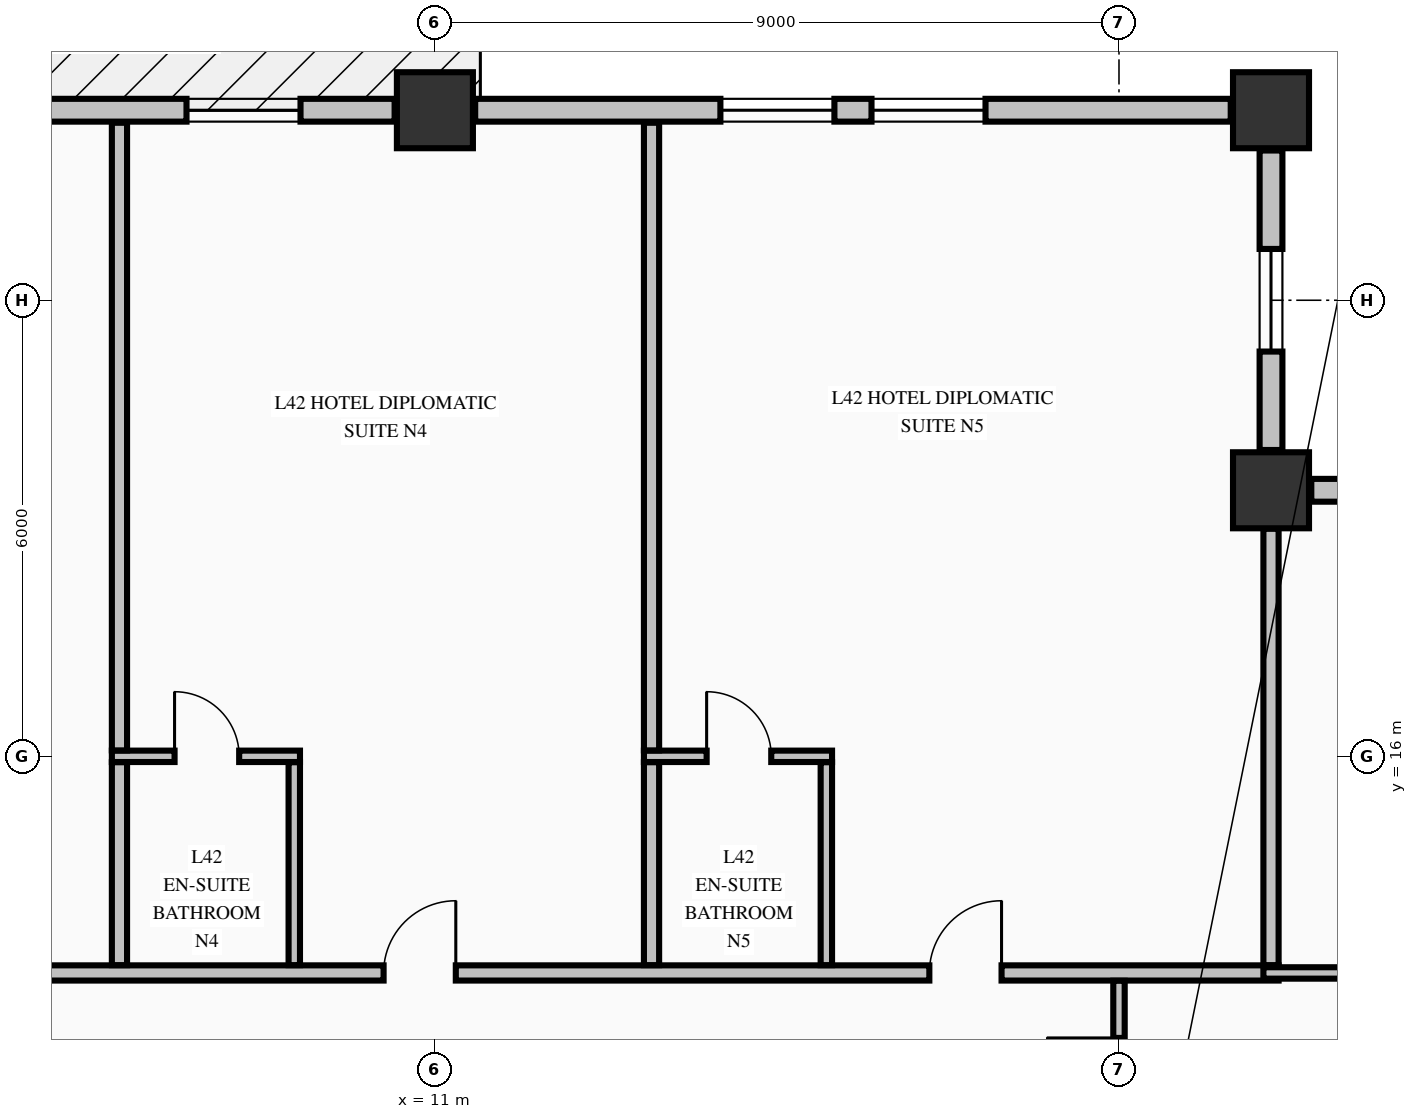
"""IFC4 building model, lengths in metres.
Left out: names, types, materials, properties, quantities, classifications, styles, units other than length and angle.
Written with IfcOpenShell. Run it as: python <this file> out.ifc"""

import sys

from ifc_helpers import new_model, si_unit, direction, frame, frame_2d, origin, origin_2d, place, context, subcontext, project, spatial, rectangle, extrude, element, fill, save


model = new_model("IFC4")
c1 = context("Model", 3, precision=1e-05, world=origin(), true_north=direction((0.0, 1.0)))
c2 = subcontext(c1, "Body", "Model", "MODEL_VIEW")
j1 = project(units=[si_unit("LENGTHUNIT", "METRE"), si_unit("PLANEANGLEUNIT", "RADIAN")], contexts=[c1])
p1 = place(None, origin())
s1 = spatial("IfcSite", under=j1, at=p1, CompositionType="ELEMENT")
p2 = place(p1, origin())
s2 = spatial("IfcBuilding", under=s1, at=p2, CompositionType="ELEMENT")
p3 = place(p2, frame((0.0, 0.0, 166.06)))
s3 = spatial("IfcBuildingStorey", under=s2, at=p3, CompositionType="ELEMENT", Elevation=166.06)
for number, where, z_axis, x_axis in (
    (1, (11.0, 24.5, -0.25), (0.0, 0.0, 1.0), (1.0, 0.0, 0.0)),
    (2, (22.0, 24.5, -0.25), (0.0, 0.0, 1.0), (1.0, 0.0, 0.0)),
    (3, (22.0, 19.5, -0.25), (0.0, 0.0, 1.0), (1.0, 0.0, 0.0)),
):
    element("IfcColumn", number, at=place(p3, frame(where, z_axis=z_axis, x_axis=x_axis)), inside=s3, PredefinedType="COLUMN", context=c2, shape_type="SweptSolid", body=[
        extrude(rectangle(XDim=1.0, YDim=1.0, at=origin_2d()), origin(), (0.0, 0.0, 1.0), 3.4),
    ])
p4 = place(p3, frame((26.47, 19.5, 0.0), z_axis=(0.0, 0.0, 1.0), x_axis=(-1.0, 0.0, 0.0)))
e4 = element("IfcWall", 4, at=p4, inside=s3, PredefinedType="STANDARD", context=c2, shape_type="SweptSolid", body=[
    extrude(rectangle(XDim=3.94, YDim=0.3, at=frame_2d((1.97, 0.0))), origin(), (0.0, 0.0, 1.0), 2.542),
])
p5 = place(p4, frame((1.295, 0.0, 0.68)))
e5 = element("IfcOpeningElement", 5, at=p5, cuts=e4, PredefinedType="OPENING", context=c2, shape_type="SweptSolid", body=[
    extrude(rectangle(XDim=1.35, YDim=1.42, at=frame_2d((0.675, 0.71))), frame((0.0, 0.16, 0.0), z_axis=(0.0, -1.0, 0.0), x_axis=(1.0, 0.0, 0.0)), (0.0, 0.0, 1.0), 0.32),
])
p6 = place(p3, frame((22.0, 20.03, 0.0), z_axis=(0.0, 0.0, 1.0), x_axis=(0.0, 1.0, 0.0)))
e6 = element("IfcWall", 6, at=p6, inside=s3, PredefinedType="STANDARD", context=c2, shape_type="SweptSolid", body=[
    extrude(rectangle(XDim=3.94, YDim=0.3, at=frame_2d((1.97, 0.0))), origin(), (0.0, 0.0, 1.0), 2.542),
])
p7 = place(p6, frame((1.295, 0.0, 0.68)))
e7 = element("IfcOpeningElement", 7, at=p7, cuts=e6, PredefinedType="OPENING", context=c2, shape_type="SweptSolid", body=[
    extrude(rectangle(XDim=1.35, YDim=1.42, at=frame_2d((0.675, 0.71))), frame((0.0, 0.16, 0.0), z_axis=(0.0, -1.0, 0.0), x_axis=(1.0, 0.0, 0.0)), (0.0, 0.0, 1.0), 0.32),
])
p8 = place(p3, frame((10.47, 24.5, 0.0), z_axis=(0.0, 0.0, 1.0), x_axis=(-1.0, 0.0, 0.0)))
e8 = element("IfcWall", 8, at=p8, inside=s3, PredefinedType="STANDARD", context=c2, shape_type="SweptSolid", body=[
    extrude(rectangle(XDim=9.94, YDim=0.3, at=frame_2d((4.97, 0.0))), origin(), (0.0, 0.0, 1.0), 2.542),
])
p9 = place(p8, frame((1.238, 0.0, 0.72)))
e9 = element("IfcOpeningElement", 9, at=p9, cuts=e8, PredefinedType="OPENING", context=c2, shape_type="SweptSolid", body=[
    extrude(rectangle(XDim=1.5, YDim=1.6, at=frame_2d((0.75, 0.8))), frame((0.0, 0.16, 0.0), z_axis=(0.0, -1.0, 0.0), x_axis=(1.0, 0.0, 0.0)), (0.0, 0.0, 1.0), 0.32),
])
p10 = place(p8, frame((5.214, 0.0, 0.72)))
e10 = element("IfcOpeningElement", 10, at=p10, cuts=e8, PredefinedType="OPENING", context=c2, shape_type="SweptSolid", body=[
    extrude(rectangle(XDim=1.5, YDim=1.6, at=frame_2d((0.75, 0.8))), frame((0.0, 0.16, 0.0), z_axis=(0.0, -1.0, 0.0), x_axis=(1.0, 0.0, 0.0)), (0.0, 0.0, 1.0), 0.32),
])
p11 = place(p8, frame((7.202, 0.0, 0.72)))
e11 = element("IfcOpeningElement", 11, at=p11, cuts=e8, PredefinedType="OPENING", context=c2, shape_type="SweptSolid", body=[
    extrude(rectangle(XDim=1.5, YDim=1.6, at=frame_2d((0.75, 0.8))), frame((0.0, 0.16, 0.0), z_axis=(0.0, -1.0, 0.0), x_axis=(1.0, 0.0, 0.0)), (0.0, 0.0, 1.0), 0.32),
])
p12 = place(p3, frame((21.47, 24.5, 0.0), z_axis=(0.0, 0.0, 1.0), x_axis=(-1.0, 0.0, 0.0)))
e12 = element("IfcWall", 12, at=p12, inside=s3, PredefinedType="STANDARD", context=c2, shape_type="SweptSolid", body=[
    extrude(rectangle(XDim=9.94, YDim=0.3, at=frame_2d((4.97, 0.0))), origin(), (0.0, 0.0, 1.0), 2.542),
])
p13 = place(p12, frame((3.226, 0.0, 0.72)))
e13 = element("IfcOpeningElement", 13, at=p13, cuts=e12, PredefinedType="OPENING", context=c2, shape_type="SweptSolid", body=[
    extrude(rectangle(XDim=1.5, YDim=1.6, at=frame_2d((0.75, 0.8))), frame((0.0, 0.16, 0.0), z_axis=(0.0, -1.0, 0.0), x_axis=(1.0, 0.0, 0.0)), (0.0, 0.0, 1.0), 0.32),
])
p14 = place(p12, frame((5.214, 0.0, 0.72)))
e14 = element("IfcOpeningElement", 14, at=p14, cuts=e12, PredefinedType="OPENING", context=c2, shape_type="SweptSolid", body=[
    extrude(rectangle(XDim=1.5, YDim=1.6, at=frame_2d((0.75, 0.8))), frame((0.0, 0.16, 0.0), z_axis=(0.0, -1.0, 0.0), x_axis=(1.0, 0.0, 0.0)), (0.0, 0.0, 1.0), 0.32),
])
p15 = place(p3, frame((-17.1, 13.15, 0.0), z_axis=(0.0, 0.0, 1.0), x_axis=(1.0, 0.0, 0.0)))
e15 = element("IfcWall", 15, at=p15, inside=s3, PredefinedType="PARTITIONING", context=c2, shape_type="SweptSolid", body=[
    extrude(rectangle(XDim=39.2, YDim=0.2, at=frame_2d((19.6, 0.0))), origin(), (0.0, 0.0, 1.0), 3.15),
])
p16 = place(p15, frame((3.575, 0.0, 0.0)))
e16 = element("IfcOpeningElement", 16, at=p16, cuts=e15, PredefinedType="OPENING", context=c2, shape_type="SweptSolid", body=[
    extrude(rectangle(XDim=0.95, YDim=2.15, at=frame_2d((0.475, 1.075))), frame((0.0, 0.11, 0.0), z_axis=(0.0, -1.0, 0.0), x_axis=(1.0, 0.0, 0.0)), (0.0, 0.0, 1.0), 0.22),
])
p17 = place(p15, frame((14.625, 0.0, 0.0)))
e17 = element("IfcOpeningElement", 17, at=p17, cuts=e15, PredefinedType="OPENING", context=c2, shape_type="SweptSolid", body=[
    extrude(rectangle(XDim=0.95, YDim=2.15, at=frame_2d((0.475, 1.075))), frame((0.0, 0.11, 0.0), z_axis=(0.0, -1.0, 0.0), x_axis=(1.0, 0.0, 0.0)), (0.0, 0.0, 1.0), 0.22),
])
p18 = place(p15, frame((21.125, 0.0, 0.0)))
e18 = element("IfcOpeningElement", 18, at=p18, cuts=e15, PredefinedType="OPENING", context=c2, shape_type="SweptSolid", body=[
    extrude(rectangle(XDim=0.95, YDim=2.15, at=frame_2d((0.475, 1.075))), frame((0.0, 0.11, 0.0), z_axis=(0.0, -1.0, 0.0), x_axis=(1.0, 0.0, 0.0)), (0.0, 0.0, 1.0), 0.22),
])
p19 = place(p15, frame((27.425, 0.0, 0.0)))
e19 = element("IfcOpeningElement", 19, at=p19, cuts=e15, PredefinedType="OPENING", context=c2, shape_type="SweptSolid", body=[
    extrude(rectangle(XDim=0.95, YDim=2.15, at=frame_2d((0.475, 1.075))), frame((0.0, 0.11, 0.0), z_axis=(0.0, -1.0, 0.0), x_axis=(1.0, 0.0, 0.0)), (0.0, 0.0, 1.0), 0.22),
])
p20 = place(p15, frame((34.605, 0.0, 0.0)))
e20 = element("IfcOpeningElement", 20, at=p20, cuts=e15, PredefinedType="OPENING", context=c2, shape_type="SweptSolid", body=[
    extrude(rectangle(XDim=0.95, YDim=2.15, at=frame_2d((0.475, 1.075))), frame((0.0, 0.11, 0.0), z_axis=(0.0, -1.0, 0.0), x_axis=(1.0, 0.0, 0.0)), (0.0, 0.0, 1.0), 0.22),
])
p21 = place(p3, frame((21.9, 13.15, 0.0), z_axis=(0.0, 0.0, 1.0), x_axis=(1.0, 0.0, 0.0)))
e21 = element("IfcWall", 21, at=p21, inside=s3, PredefinedType="PARTITIONING", context=c2, shape_type="SweptSolid", body=[
    extrude(rectangle(XDim=4.935, YDim=0.15, at=frame_2d((2.468, 0.0))), origin(), (0.0, 0.0, 1.0), 3.15),
])
p22 = place(p3, frame((6.75, 16.0, 0.0), z_axis=(0.0, 0.0, 1.0), x_axis=(1.0, 0.0, 0.0)))
e22 = element("IfcWall", 22, at=p22, inside=s3, PredefinedType="PARTITIONING", context=c2, shape_type="SweptSolid", body=[
    extrude(rectangle(XDim=2.475, YDim=0.15, at=frame_2d((1.238, 0.0))), origin(), (0.0, 0.0, 1.0), 3.15),
])
p23 = place(p22, frame((0.825, 0.0, 0.0)))
e23 = element("IfcOpeningElement", 23, at=p23, cuts=e22, PredefinedType="OPENING", context=c2, shape_type="SweptSolid", body=[
    extrude(rectangle(XDim=0.85, YDim=2.1, at=frame_2d((0.425, 1.05))), frame((0.0, 0.085, 0.0), z_axis=(0.0, -1.0, 0.0), x_axis=(1.0, 0.0, 0.0)), (0.0, 0.0, 1.0), 0.17),
])
p24 = place(p3, frame((13.75, 16.0, 0.0), z_axis=(0.0, 0.0, 1.0), x_axis=(1.0, 0.0, 0.0)))
e24 = element("IfcWall", 24, at=p24, inside=s3, PredefinedType="PARTITIONING", context=c2, shape_type="SweptSolid", body=[
    extrude(rectangle(XDim=2.475, YDim=0.15, at=frame_2d((1.238, 0.0))), origin(), (0.0, 0.0, 1.0), 3.15),
])
p25 = place(p24, frame((0.825, 0.0, 0.0)))
e25 = element("IfcOpeningElement", 25, at=p25, cuts=e24, PredefinedType="OPENING", context=c2, shape_type="SweptSolid", body=[
    extrude(rectangle(XDim=0.85, YDim=2.1, at=frame_2d((0.425, 1.05))), frame((0.0, 0.085, 0.0), z_axis=(0.0, -1.0, 0.0), x_axis=(1.0, 0.0, 0.0)), (0.0, 0.0, 1.0), 0.17),
])
p26 = place(p3, frame((6.85, 13.253, 0.0), z_axis=(0.0, 0.0, 1.0), x_axis=(0.0, 1.0, 0.0)))
e26 = element("IfcWall", 26, at=p26, inside=s3, PredefinedType="PARTITIONING", context=c2, shape_type="SweptSolid", body=[
    extrude(rectangle(XDim=2.669, YDim=0.2, at=frame_2d((1.334, 0.0))), origin(), (0.0, 0.0, 1.0), 3.15),
])
p27 = place(p3, frame((6.85, 16.078, 0.0), z_axis=(0.0, 0.0, 1.0), x_axis=(0.0, 1.0, 0.0)))
e27 = element("IfcWall", 27, at=p27, inside=s3, PredefinedType="PARTITIONING", context=c2, shape_type="SweptSolid", body=[
    extrude(rectangle(XDim=8.257, YDim=0.2, at=frame_2d((4.128, 0.0))), origin(), (0.0, 0.0, 1.0), 3.15),
])
p28 = place(p3, frame((9.15, 13.253, 0.0), z_axis=(0.0, 0.0, 1.0), x_axis=(0.0, 1.0, 0.0)))
e28 = element("IfcWall", 28, at=p28, inside=s3, PredefinedType="PARTITIONING", context=c2, shape_type="SweptSolid", body=[
    extrude(rectangle(XDim=2.669, YDim=0.15, at=frame_2d((1.334, 0.0))), origin(), (0.0, 0.0, 1.0), 3.15),
])
p29 = place(p3, frame((13.85, 13.253, 0.0), z_axis=(0.0, 0.0, 1.0), x_axis=(0.0, 1.0, 0.0)))
e29 = element("IfcWall", 29, at=p29, inside=s3, PredefinedType="PARTITIONING", context=c2, shape_type="SweptSolid", body=[
    extrude(rectangle(XDim=2.669, YDim=0.2, at=frame_2d((1.334, 0.0))), origin(), (0.0, 0.0, 1.0), 3.15),
])
p30 = place(p3, frame((13.85, 16.078, 0.0), z_axis=(0.0, 0.0, 1.0), x_axis=(0.0, 1.0, 0.0)))
e30 = element("IfcWall", 30, at=p30, inside=s3, PredefinedType="PARTITIONING", context=c2, shape_type="SweptSolid", body=[
    extrude(rectangle(XDim=8.257, YDim=0.2, at=frame_2d((4.128, 0.0))), origin(), (0.0, 0.0, 1.0), 3.15),
])
p31 = place(p3, frame((16.15, 13.253, 0.0), z_axis=(0.0, 0.0, 1.0), x_axis=(0.0, 1.0, 0.0)))
e31 = element("IfcWall", 31, at=p31, inside=s3, PredefinedType="PARTITIONING", context=c2, shape_type="SweptSolid", body=[
    extrude(rectangle(XDim=2.669, YDim=0.15, at=frame_2d((1.334, 0.0))), origin(), (0.0, 0.0, 1.0), 3.15),
])
p32 = place(p3, frame((20.0, 10.931, 0.0), z_axis=(0.0, 0.0, 1.0), x_axis=(0.0, 1.0, 0.0)))
e32 = element("IfcWall", 32, at=p32, inside=s3, PredefinedType="PARTITIONING", context=c2, shape_type="SweptSolid", body=[
    extrude(rectangle(XDim=2.116, YDim=0.15, at=frame_2d((1.058, 0.0))), origin(), (0.0, 0.0, 1.0), 2.342),
])
p33 = place(p32, frame((0.414, 0.0, 0.0)))
e33 = element("IfcOpeningElement", 33, at=p33, cuts=e32, PredefinedType="OPENING", context=c2, shape_type="SweptSolid", body=[
    extrude(rectangle(XDim=0.95, YDim=2.15, at=frame_2d((0.475, 1.075))), frame((0.0, 0.085, 0.0), z_axis=(0.0, -1.0, 0.0), x_axis=(1.0, 0.0, 0.0)), (0.0, 0.0, 1.0), 0.17),
])
p34 = place(p3, frame((22.0, 13.253, 0.0), z_axis=(0.0, 0.0, 1.0), x_axis=(0.0, 1.0, 0.0)))
e34 = element("IfcWall", 34, at=p34, inside=s3, PredefinedType="PARTITIONING", context=c2, shape_type="SweptSolid", body=[
    extrude(rectangle(XDim=5.741, YDim=0.2, at=frame_2d((2.871, 0.0))), origin(), (0.0, 0.0, 1.0), 3.15),
])
p35 = place(p7, origin())
e35 = element("IfcWindow", 35, at=p35, inside=s3, PartitioningType="SINGLE_PANEL", PredefinedType="WINDOW", context=c2, shape_type="SweptSolid", body=[
    extrude(rectangle(XDim=1.35, YDim=1.42, at=frame_2d((0.675, 0.71))), frame((0.0, 0.03, 0.0), z_axis=(0.0, -1.0, 0.0), x_axis=(1.0, 0.0, 0.0)), (0.0, 0.0, 1.0), 0.06),
])
fill(e7, e35)
p36 = place(p9, origin())
e36 = element("IfcWindow", 36, at=p36, inside=s3, PartitioningType="SINGLE_PANEL", PredefinedType="WINDOW", context=c2, shape_type="SweptSolid", body=[
    extrude(rectangle(XDim=1.5, YDim=1.6, at=frame_2d((0.75, 0.8))), frame((0.0, 0.03, 0.0), z_axis=(0.0, -1.0, 0.0), x_axis=(1.0, 0.0, 0.0)), (0.0, 0.0, 1.0), 0.06),
])
fill(e9, e36)
p37 = place(p13, origin())
e37 = element("IfcWindow", 37, at=p37, inside=s3, PartitioningType="SINGLE_PANEL", PredefinedType="WINDOW", context=c2, shape_type="SweptSolid", body=[
    extrude(rectangle(XDim=1.5, YDim=1.6, at=frame_2d((0.75, 0.8))), frame((0.0, 0.03, 0.0), z_axis=(0.0, -1.0, 0.0), x_axis=(1.0, 0.0, 0.0)), (0.0, 0.0, 1.0), 0.06),
])
fill(e13, e37)
p38 = place(p14, origin())
e38 = element("IfcWindow", 38, at=p38, inside=s3, PartitioningType="SINGLE_PANEL", PredefinedType="WINDOW", context=c2, shape_type="SweptSolid", body=[
    extrude(rectangle(XDim=1.5, YDim=1.6, at=frame_2d((0.75, 0.8))), frame((0.0, 0.03, 0.0), z_axis=(0.0, -1.0, 0.0), x_axis=(1.0, 0.0, 0.0)), (0.0, 0.0, 1.0), 0.06),
])
fill(e14, e38)
p39 = place(p19, origin())
e39 = element("IfcDoor", 39, at=p39, inside=s3, OperationType="SINGLE_SWING_RIGHT", PredefinedType="DOOR", context=c2, shape_type="SweptSolid", body=[
    extrude(rectangle(XDim=0.95, YDim=2.15, at=frame_2d((0.475, 1.075))), frame((0.0, 0.025, 0.0), z_axis=(0.0, -1.0, 0.0), x_axis=(1.0, 0.0, 0.0)), (0.0, 0.0, 1.0), 0.05),
])
fill(e19, e39)
p40 = place(p23, origin())
e40 = element("IfcDoor", 40, at=p40, inside=s3, OperationType="SINGLE_SWING_LEFT", PredefinedType="DOOR", context=c2, shape_type="SweptSolid", body=[
    extrude(rectangle(XDim=0.85, YDim=2.1, at=frame_2d((0.425, 1.05))), frame((0.0, 0.025, 0.0), z_axis=(0.0, -1.0, 0.0), x_axis=(1.0, 0.0, 0.0)), (0.0, 0.0, 1.0), 0.05),
])
fill(e23, e40)
p41 = place(p20, origin())
e41 = element("IfcDoor", 41, at=p41, inside=s3, OperationType="SINGLE_SWING_RIGHT", PredefinedType="DOOR", context=c2, shape_type="SweptSolid", body=[
    extrude(rectangle(XDim=0.95, YDim=2.15, at=frame_2d((0.475, 1.075))), frame((0.0, 0.025, 0.0), z_axis=(0.0, -1.0, 0.0), x_axis=(1.0, 0.0, 0.0)), (0.0, 0.0, 1.0), 0.05),
])
fill(e20, e41)
p42 = place(p25, origin())
e42 = element("IfcDoor", 42, at=p42, inside=s3, OperationType="SINGLE_SWING_LEFT", PredefinedType="DOOR", context=c2, shape_type="SweptSolid", body=[
    extrude(rectangle(XDim=0.85, YDim=2.1, at=frame_2d((0.425, 1.05))), frame((0.0, 0.025, 0.0), z_axis=(0.0, -1.0, 0.0), x_axis=(1.0, 0.0, 0.0)), (0.0, 0.0, 1.0), 0.05),
])
fill(e25, e42)
p43 = place(p33, origin())
e43 = element("IfcDoor", 43, at=p43, inside=s3, OperationType="SINGLE_SWING_RIGHT", PredefinedType="DOOR", context=c2, shape_type="SweptSolid", body=[
    extrude(rectangle(XDim=0.95, YDim=2.15, at=frame_2d((0.475, 1.075))), frame((0.0, 0.025, 0.0), z_axis=(0.0, -1.0, 0.0), x_axis=(1.0, 0.0, 0.0)), (0.0, 0.0, 1.0), 0.05),
])
fill(e33, e43)
save(model, sys.argv[1])
